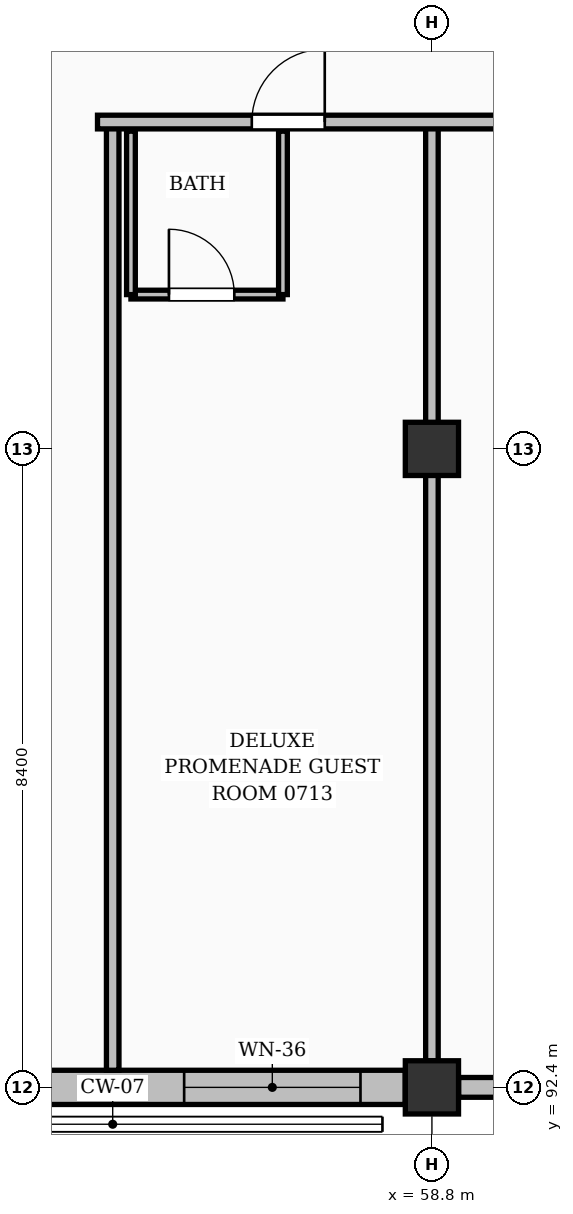
"""IFC4 building model, lengths in metres.
Left out: names, types, materials, properties, quantities, classifications, styles, units other than length and angle.
Written with IfcOpenShell. Run it as: python <this file> out.ifc"""

import sys

from ifc_helpers import new_model, si_unit, direction, frame, frame_2d, origin, origin_2d, place, context, subcontext, project, spatial, rectangle, extrude, element, fill, save


model = new_model("IFC4")
c1 = context("Model", 3, precision=1e-05, world=origin(), true_north=direction((0.0, 1.0)))
c2 = subcontext(c1, "Body", "Model", "MODEL_VIEW")
j1 = project(units=[si_unit("LENGTHUNIT", "METRE"), si_unit("PLANEANGLEUNIT", "RADIAN")], contexts=[c1])
p1 = place(None, origin())
s1 = spatial("IfcSite", under=j1, at=p1, CompositionType="ELEMENT")
p2 = place(p1, origin())
s2 = spatial("IfcBuilding", under=s1, at=p2, CompositionType="ELEMENT")
p3 = place(p2, frame((0.0, 0.0, 25.2)))
s3 = spatial("IfcBuildingStorey", under=s2, at=p3, CompositionType="ELEMENT", Elevation=25.2)
for number, where, z_axis, x_axis in (
    (1, (58.8, 92.4, 0.0), (0.0, 0.0, 1.0), (1.0, 0.0, 0.0)),
    (2, (58.8, 100.8, 0.0), (0.0, 0.0, 1.0), (1.0, 0.0, 0.0)),
):
    element("IfcColumn", number, at=place(p3, frame(where, z_axis=z_axis, x_axis=x_axis)), inside=s3, PredefinedType="COLUMN", context=c2, shape_type="SweptSolid", body=[
        extrude(rectangle(XDim=0.7, YDim=0.7, at=origin_2d()), origin(), (0.0, 0.0, 1.0), 3.36),
    ])
p4 = place(p3, frame((50.751, 92.4, 0.0), z_axis=(0.0, 0.0, 1.0), x_axis=(1.0, 0.0, 0.0)))
e3 = element("IfcWall", 3, at=p4, inside=s3, PredefinedType="SOLIDWALL", context=c2, shape_type="SweptSolid", body=[
    extrude(rectangle(XDim=7.698, YDim=0.45, at=frame_2d((3.849, 0.0))), origin(), (0.0, 0.0, 1.0), 2.494),
])
p5 = place(p4, frame((0.549, 0.0, 0.25)))
e4 = element("IfcOpeningElement", 4, at=p5, cuts=e3, PredefinedType="OPENING", context=c2, shape_type="SweptSolid", body=[
    extrude(rectangle(XDim=2.4, YDim=1.75, at=frame_2d((1.2, 0.875))), frame((0.0, 0.235, 0.0), z_axis=(0.0, -1.0, 0.0), x_axis=(1.0, 0.0, 0.0)), (0.0, 0.0, 1.0), 0.47),
])
p6 = place(p4, frame((4.789, 0.0, 0.25)))
e5 = element("IfcOpeningElement", 5, at=p6, cuts=e3, PredefinedType="OPENING", context=c2, shape_type="SweptSolid", body=[
    extrude(rectangle(XDim=2.32, YDim=1.9, at=frame_2d((1.16, 0.95))), frame((0.0, 0.235, 0.0), z_axis=(0.0, -1.0, 0.0), x_axis=(1.0, 0.0, 0.0)), (0.0, 0.0, 1.0), 0.47),
])
p7 = place(p3, frame((59.151, 92.4, 0.0), z_axis=(0.0, 0.0, 1.0), x_axis=(1.0, 0.0, 0.0)))
e6 = element("IfcWall", 6, at=p7, inside=s3, PredefinedType="SOLIDWALL", context=c2, shape_type="SweptSolid", body=[
    extrude(rectangle(XDim=7.698, YDim=0.26, at=frame_2d((3.849, 0.0))), origin(), (0.0, 0.0, 1.0), 2.494),
])
p8 = place(p7, frame((1.024, 0.0, 0.0)))
e7 = element("IfcOpeningElement", 7, at=p8, cuts=e6, PredefinedType="OPENING", context=c2, shape_type="SweptSolid", body=[
    extrude(rectangle(XDim=1.55, YDim=2.08, at=frame_2d((0.775, 1.04))), frame((0.0, 0.14, 0.0), z_axis=(0.0, -1.0, 0.0), x_axis=(1.0, 0.0, 0.0)), (0.0, 0.0, 1.0), 0.28),
])
p9 = place(p7, frame((4.639, 0.0, 0.25)))
e8 = element("IfcOpeningElement", 8, at=p9, cuts=e6, PredefinedType="OPENING", context=c2, shape_type="SweptSolid", body=[
    extrude(rectangle(XDim=2.32, YDim=1.9, at=frame_2d((1.16, 0.95))), frame((0.0, 0.14, 0.0), z_axis=(0.0, -1.0, 0.0), x_axis=(1.0, 0.0, 0.0)), (0.0, 0.0, 1.0), 0.28),
])
p10 = place(p3, frame((54.84, 102.83, 0.0), z_axis=(0.0, 0.0, 1.0), x_axis=(1.0, 0.0, 0.0)))
e9 = element("IfcWall", 9, at=p10, inside=s3, PredefinedType="PARTITIONING", context=c2, shape_type="SweptSolid", body=[
    extrude(rectangle(XDim=2.0, YDim=0.115, at=frame_2d((1.0, 0.0))), origin(), (0.0, 0.0, 1.0), 3.12),
])
p11 = place(p10, frame((0.5, 0.0, 0.0)))
e10 = element("IfcOpeningElement", 10, at=p11, cuts=e9, PredefinedType="OPENING", context=c2, shape_type="SweptSolid", body=[
    extrude(rectangle(XDim=0.86, YDim=2.05, at=frame_2d((0.43, 1.025))), frame((0.0, 0.067, 0.0), z_axis=(0.0, -1.0, 0.0), x_axis=(1.0, 0.0, 0.0)), (0.0, 0.0, 1.0), 0.135),
])
for number, where, z_axis, x_axis in (
    (11, (54.84, 102.83, 0.0), (0.0, 0.0, 1.0), (0.0, 1.0, 0.0)),
    (12, (56.84, 102.83, 0.0), (0.0, 0.0, 1.0), (0.0, 1.0, 0.0)),
):
    element("IfcWall", number, at=place(p3, frame(where, z_axis=z_axis, x_axis=x_axis)), inside=s3, PredefinedType="PARTITIONING", context=c2, shape_type="SweptSolid", body=[
        extrude(rectangle(XDim=2.15, YDim=0.115, at=frame_2d((1.075, 0.0))), origin(), (0.0, 0.0, 1.0), 3.12),
    ])
p12 = place(p3, frame((54.6, 92.625, 0.0), z_axis=(0.0, 0.0, 1.0), x_axis=(0.0, 1.0, 0.0)))
e13 = element("IfcWall", 13, at=p12, inside=s3, PredefinedType="PARTITIONING", context=c2, shape_type="SweptSolid", body=[
    extrude(rectangle(XDim=12.475, YDim=0.165, at=frame_2d((6.238, 0.0))), origin(), (0.0, 0.0, 1.0), 3.12),
])
p13 = place(p3, frame((58.8, 92.75, 0.0), z_axis=(0.0, 0.0, 1.0), x_axis=(0.0, 1.0, 0.0)))
e14 = element("IfcWall", 14, at=p13, inside=s3, PredefinedType="PARTITIONING", context=c2, shape_type="SweptSolid", body=[
    extrude(rectangle(XDim=12.35, YDim=0.165, at=frame_2d((6.175, 0.0))), origin(), (0.0, 0.0, 1.0), 2.455),
])
p14 = place(p3, frame((54.4, 105.1, 0.0), z_axis=(0.0, 0.0, 1.0), x_axis=(1.0, 0.0, 0.0)))
e15 = element("IfcWall", 15, at=p14, inside=s3, PredefinedType="PARTITIONING", context=c2, shape_type="SweptSolid", body=[
    extrude(rectangle(XDim=12.65, YDim=0.18, at=frame_2d((6.325, 0.0))), origin(), (0.0, 0.0, 1.0), 3.12),
])
p15 = place(p14, frame((2.03, 0.0, 0.0)))
e16 = element("IfcOpeningElement", 16, at=p15, cuts=e15, PredefinedType="OPENING", context=c2, shape_type="SweptSolid", body=[
    extrude(rectangle(XDim=0.96, YDim=2.15, at=frame_2d((0.48, 1.075))), frame((0.0, 0.1, 0.0), z_axis=(0.0, -1.0, 0.0), x_axis=(1.0, 0.0, 0.0)), (0.0, 0.0, 1.0), 0.2),
])
p16 = place(p14, frame((5.9, 0.0, 0.0)))
e17 = element("IfcOpeningElement", 17, at=p16, cuts=e15, PredefinedType="OPENING", context=c2, shape_type="SweptSolid", body=[
    extrude(rectangle(XDim=1.02, YDim=2.15, at=frame_2d((0.51, 1.075))), frame((0.0, 0.1, 0.0), z_axis=(0.0, -1.0, 0.0), x_axis=(1.0, 0.0, 0.0)), (0.0, 0.0, 1.0), 0.2),
])
p17 = place(p6, origin())
e18 = element("IfcWindow", 18, at=p17, inside=s3, PartitioningType="DOUBLE_PANEL_VERTICAL", PredefinedType="WINDOW", context=c2, shape_type="SweptSolid", body=[
    extrude(rectangle(XDim=2.32, YDim=1.9, at=frame_2d((1.16, 0.95))), frame((0.0, 0.03, 0.0), z_axis=(0.0, -1.0, 0.0), x_axis=(1.0, 0.0, 0.0)), (0.0, 0.0, 1.0), 0.06),
])
fill(e5, e18)
p18 = place(p11, origin())
e19 = element("IfcDoor", 19, at=p18, inside=s3, OperationType="SINGLE_SWING_LEFT", PredefinedType="DOOR", context=c2, shape_type="SweptSolid", body=[
    extrude(rectangle(XDim=0.86, YDim=2.05, at=frame_2d((0.43, 1.025))), frame((0.0, 0.025, 0.0), z_axis=(0.0, -1.0, 0.0), x_axis=(1.0, 0.0, 0.0)), (0.0, 0.0, 1.0), 0.05),
])
fill(e10, e19)
p19 = place(p15, origin())
e20 = element("IfcDoor", 20, at=p19, inside=s3, OperationType="SINGLE_SWING_RIGHT", PredefinedType="DOOR", context=c2, shape_type="SweptSolid", body=[
    extrude(rectangle(XDim=0.96, YDim=2.15, at=frame_2d((0.48, 1.075))), frame((0.0, 0.025, 0.0), z_axis=(0.0, -1.0, 0.0), x_axis=(1.0, 0.0, 0.0)), (0.0, 0.0, 1.0), 0.05),
])
fill(e16, e20)
save(model, sys.argv[1])
